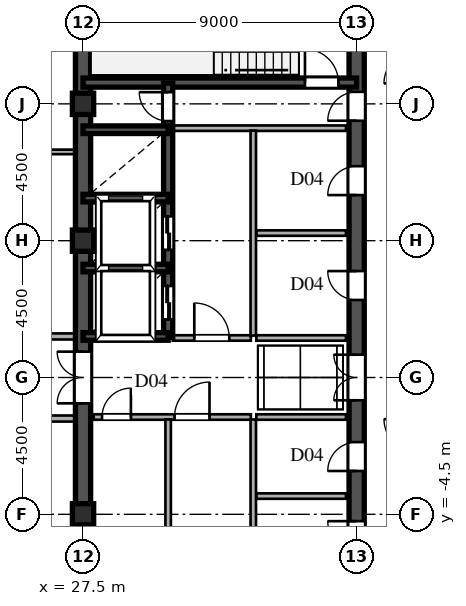
"""IFC4 building model, lengths in metres.
Left out: names, types, materials, properties, quantities, classifications, styles, units other than length and angle.
Written with IfcOpenShell. Run it as: python <this file> out.ifc"""

import sys

from ifc_helpers import new_model, si_unit, direction, frame, frame_2d, origin, origin_2d, place, context, subcontext, project, spatial, rectangle, hollow_rectangle, extrude, source, transform, mapped, element, fill, save


model = new_model("IFC4")
c1 = context("Model", 3, precision=1e-05, world=origin(), true_north=direction((0.0, 1.0)))
c2 = subcontext(c1, "Body", "Model", "MODEL_VIEW")
j1 = project(units=[si_unit("LENGTHUNIT", "METRE"), si_unit("PLANEANGLEUNIT", "RADIAN")], contexts=[c1])
p1 = place(None, origin())
s1 = spatial("IfcSite", under=j1, at=p1, CompositionType="ELEMENT")
p2 = place(p1, origin())
s2 = spatial("IfcBuilding", under=s1, at=p2, CompositionType="ELEMENT")
p3 = place(p2, frame((0.0, 0.0, 254.4)))
s3 = spatial("IfcBuildingStorey", under=s2, at=p3, CompositionType="ELEMENT", Elevation=254.4)
m1 = source(origin(), c2, "Body", "SweptSolid", [
    extrude(hollow_rectangle(XDim=0.7, YDim=0.7, WallThickness=0.03, at=origin_2d()), origin(), (0.0, 0.0, 1.0), 3.75),
])
for number, where, z_axis, x_axis in (
    (1, (27.5, -4.5, 0.0), (0.0, 0.0, 1.0), (1.0, 0.0, 0.0)),
    (2, (27.5, 4.5, 0.0), (0.0, 0.0, 1.0), (1.0, 0.0, 0.0)),
    (3, (27.5, 9.0, 0.0), (0.0, 0.0, 1.0), (1.0, 0.0, 0.0)),
):
    element("IfcColumn", number, at=place(p3, frame(where, z_axis=z_axis, x_axis=x_axis)), inside=s3, PredefinedType="COLUMN", context=c2, shape_type="MappedRepresentation", body=[
        mapped(m1, transform((0.0, 0.0, 0.0), scale=1.0)),
    ])
for number, where, z_axis, x_axis in (
    (4, (27.5, -13.5, 0.0), (0.0, 0.0, 1.0), (0.0, 1.0, 0.0)),
    (5, (27.5, 1.3, 0.0), (0.0, 0.0, 1.0), (0.0, 1.0, 0.0)),
):
    element("IfcWall", number, at=place(p3, frame(where, z_axis=z_axis, x_axis=x_axis)), inside=s3, PredefinedType="SHEAR", context=c2, shape_type="SweptSolid", body=[
        extrude(rectangle(XDim=12.2, YDim=0.5, at=frame_2d((6.1, 0.0))), origin(), (0.0, 0.0, 1.0), 3.53),
    ])
p4 = place(p3, frame((27.5, -1.3, 0.0), z_axis=(0.0, 0.0, 1.0), x_axis=(0.0, 1.0, 0.0)))
e6 = element("IfcWall", 6, at=p4, inside=s3, PredefinedType="SHEAR", context=c2, shape_type="SweptSolid", body=[
    extrude(rectangle(XDim=2.6, YDim=0.5, at=frame_2d((1.3, 0.0))), origin(), (0.0, 0.0, 1.0), 3.53),
])
p5 = place(p4, frame((0.45, 0.0, 0.0)))
e7 = element("IfcOpeningElement", 7, at=p5, cuts=e6, PredefinedType="OPENING", context=c2, shape_type="SweptSolid", body=[
    extrude(rectangle(XDim=1.7, YDim=2.35, at=frame_2d((0.85, 1.175))), frame((0.0, 0.26, 0.0), z_axis=(0.0, -1.0, 0.0), x_axis=(1.0, 0.0, 0.0)), (0.0, 0.0, 1.0), 0.52),
])
p6 = place(p3, frame((36.5, -1.3, 0.0), z_axis=(0.0, 0.0, 1.0), x_axis=(0.0, 1.0, 0.0)))
e8 = element("IfcWall", 8, at=p6, inside=s3, PredefinedType="SHEAR", context=c2, shape_type="SweptSolid", body=[
    extrude(rectangle(XDim=2.6, YDim=0.5, at=frame_2d((1.3, 0.0))), origin(), (0.0, 0.0, 1.0), 3.53),
])
p7 = place(p6, frame((0.55, 0.0, 0.0)))
e9 = element("IfcOpeningElement", 9, at=p7, cuts=e8, PredefinedType="OPENING", context=c2, shape_type="SweptSolid", body=[
    extrude(rectangle(XDim=1.5, YDim=2.3, at=frame_2d((0.75, 1.15))), frame((0.0, 0.26, 0.0), z_axis=(0.0, -1.0, 0.0), x_axis=(1.0, 0.0, 0.0)), (0.0, 0.0, 1.0), 0.52),
])
p8 = place(p3, frame((36.5, 8.2, 0.0), z_axis=(0.0, 0.0, 1.0), x_axis=(0.0, 1.0, 0.0)))
e10 = element("IfcWall", 10, at=p8, inside=s3, PredefinedType="SHEAR", context=c2, shape_type="SweptSolid", body=[
    extrude(rectangle(XDim=5.45, YDim=0.5, at=frame_2d((2.725, 0.0))), origin(), (0.0, 0.0, 1.0), 3.53),
])
p9 = place(p8, frame((0.245, 0.0, 0.0)))
e11 = element("IfcOpeningElement", 11, at=p9, cuts=e10, PredefinedType="OPENING", context=c2, shape_type="SweptSolid", body=[
    extrude(rectangle(XDim=0.95, YDim=2.15, at=frame_2d((0.475, 1.075))), frame((0.0, 0.26, 0.0), z_axis=(0.0, -1.0, 0.0), x_axis=(1.0, 0.0, 0.0)), (0.0, 0.0, 1.0), 0.52),
])
p10 = place(p3, frame((36.5, -6.5, 0.0), z_axis=(0.0, 0.0, 1.0), x_axis=(0.0, 1.0, 0.0)))
e12 = element("IfcWall", 12, at=p10, inside=s3, PredefinedType="SHEAR", context=c2, shape_type="SweptSolid", body=[
    extrude(rectangle(XDim=2.6, YDim=0.5, at=frame_2d((1.3, 0.0))), origin(), (0.0, 0.0, 1.0), 3.53),
])
p11 = place(p10, frame((0.825, 0.0, 0.0)))
e13 = element("IfcOpeningElement", 13, at=p11, cuts=e12, PredefinedType="OPENING", context=c2, shape_type="SweptSolid", body=[
    extrude(rectangle(XDim=0.95, YDim=2.15, at=frame_2d((0.475, 1.075))), frame((0.0, 0.26, 0.0), z_axis=(0.0, -1.0, 0.0), x_axis=(1.0, 0.0, 0.0)), (0.0, 0.0, 1.0), 0.52),
])
p12 = place(p3, frame((36.5, -3.9, 0.0), z_axis=(0.0, 0.0, 1.0), x_axis=(0.0, 1.0, 0.0)))
e14 = element("IfcWall", 14, at=p12, inside=s3, PredefinedType="SHEAR", context=c2, shape_type="SweptSolid", body=[
    extrude(rectangle(XDim=2.6, YDim=0.5, at=frame_2d((1.3, 0.0))), origin(), (0.0, 0.0, 1.0), 3.53),
])
p13 = place(p12, frame((0.825, 0.0, 0.0)))
e15 = element("IfcOpeningElement", 15, at=p13, cuts=e14, PredefinedType="OPENING", context=c2, shape_type="SweptSolid", body=[
    extrude(rectangle(XDim=0.95, YDim=2.15, at=frame_2d((0.475, 1.075))), frame((0.0, 0.26, 0.0), z_axis=(0.0, -1.0, 0.0), x_axis=(1.0, 0.0, 0.0)), (0.0, 0.0, 1.0), 0.52),
])
p14 = place(p3, frame((36.5, 1.3, 0.0), z_axis=(0.0, 0.0, 1.0), x_axis=(0.0, 1.0, 0.0)))
e16 = element("IfcWall", 16, at=p14, inside=s3, PredefinedType="SHEAR", context=c2, shape_type="SweptSolid", body=[
    extrude(rectangle(XDim=3.45, YDim=0.5, at=frame_2d((1.725, 0.0))), origin(), (0.0, 0.0, 1.0), 3.53),
])
p15 = place(p14, frame((1.25, 0.0, 0.0)))
e17 = element("IfcOpeningElement", 17, at=p15, cuts=e16, PredefinedType="OPENING", context=c2, shape_type="SweptSolid", body=[
    extrude(rectangle(XDim=0.95, YDim=2.15, at=frame_2d((0.475, 1.075))), frame((0.0, 0.26, 0.0), z_axis=(0.0, -1.0, 0.0), x_axis=(1.0, 0.0, 0.0)), (0.0, 0.0, 1.0), 0.52),
])
p16 = place(p3, frame((36.5, 4.75, 0.0), z_axis=(0.0, 0.0, 1.0), x_axis=(0.0, 1.0, 0.0)))
e18 = element("IfcWall", 18, at=p16, inside=s3, PredefinedType="SHEAR", context=c2, shape_type="SweptSolid", body=[
    extrude(rectangle(XDim=3.45, YDim=0.5, at=frame_2d((1.725, 0.0))), origin(), (0.0, 0.0, 1.0), 3.53),
])
p17 = place(p16, frame((1.25, 0.0, 0.0)))
e19 = element("IfcOpeningElement", 19, at=p17, cuts=e18, PredefinedType="OPENING", context=c2, shape_type="SweptSolid", body=[
    extrude(rectangle(XDim=0.95, YDim=2.15, at=frame_2d((0.475, 1.075))), frame((0.0, 0.26, 0.0), z_axis=(0.0, -1.0, 0.0), x_axis=(1.0, 0.0, 0.0)), (0.0, 0.0, 1.0), 0.52),
])
p18 = place(p3, frame((27.5, 9.7, 0.0), z_axis=(0.0, 0.0, 1.0), x_axis=(1.0, 0.0, 0.0)))
e20 = element("IfcWall", 20, at=p18, inside=s3, PredefinedType="SHEAR", context=c2, shape_type="SweptSolid", body=[
    extrude(rectangle(XDim=9.0, YDim=0.3, at=frame_2d((4.5, 0.0))), origin(), (0.0, 0.0, 1.0), 3.53),
])
p19 = place(p18, frame((7.3, 0.0, 0.0)))
e21 = element("IfcOpeningElement", 21, at=p19, cuts=e20, PredefinedType="OPENING", context=c2, shape_type="SweptSolid", body=[
    extrude(rectangle(XDim=1.1, YDim=2.2, at=frame_2d((0.55, 1.1))), frame((0.0, 0.16, 0.0), z_axis=(0.0, -1.0, 0.0), x_axis=(1.0, 0.0, 0.0)), (0.0, 0.0, 1.0), 0.32),
])
for number, where, z_axis, x_axis in (
    (22, (27.5, 1.35, 0.0), (0.0, 0.0, 1.0), (1.0, 0.0, 0.0)),
    (23, (27.5, 3.6, 0.0), (0.0, 0.0, 1.0), (1.0, 0.0, 0.0)),
    (24, (27.5, 5.9, 0.0), (0.0, 0.0, 1.0), (1.0, 0.0, 0.0)),
    (25, (27.5, 8.15, 0.0), (0.0, 0.0, 1.0), (1.0, 0.0, 0.0)),
):
    element("IfcWall", number, at=place(p3, frame(where, z_axis=z_axis, x_axis=x_axis)), inside=s3, PredefinedType="SHEAR", context=c2, shape_type="SweptSolid", body=[
        extrude(rectangle(XDim=2.8, YDim=0.25, at=frame_2d((1.4, 0.0))), origin(), (0.0, 0.0, 1.0), 3.53),
    ])
p20 = place(p3, frame((30.3, 1.32, 0.0), z_axis=(0.0, 0.0, 1.0), x_axis=(0.0, 1.0, 0.0)))
e26 = element("IfcWall", 26, at=p20, inside=s3, PredefinedType="SHEAR", context=c2, shape_type="SweptSolid", body=[
    extrude(rectangle(XDim=2.28, YDim=0.3, at=frame_2d((1.14, 0.0))), origin(), (0.0, 0.0, 1.0), 3.53),
])
p21 = place(p20, frame((0.59, 0.0, 0.0)))
e27 = element("IfcOpeningElement", 27, at=p21, cuts=e26, PredefinedType="OPENING", context=c2, shape_type="SweptSolid", body=[
    extrude(rectangle(XDim=1.1, YDim=2.2, at=frame_2d((0.55, 1.1))), frame((0.0, 0.16, 0.0), z_axis=(0.0, -1.0, 0.0), x_axis=(1.0, 0.0, 0.0)), (0.0, 0.0, 1.0), 0.32),
])
p22 = place(p3, frame((30.3, 3.6, 0.0), z_axis=(0.0, 0.0, 1.0), x_axis=(0.0, 1.0, 0.0)))
e28 = element("IfcWall", 28, at=p22, inside=s3, PredefinedType="SHEAR", context=c2, shape_type="SweptSolid", body=[
    extrude(rectangle(XDim=2.3, YDim=0.3, at=frame_2d((1.15, 0.0))), origin(), (0.0, 0.0, 1.0), 3.53),
])
p23 = place(p22, frame((0.6, 0.0, 0.0)))
e29 = element("IfcOpeningElement", 29, at=p23, cuts=e28, PredefinedType="OPENING", context=c2, shape_type="SweptSolid", body=[
    extrude(rectangle(XDim=1.1, YDim=2.2, at=frame_2d((0.55, 1.1))), frame((0.0, 0.16, 0.0), z_axis=(0.0, -1.0, 0.0), x_axis=(1.0, 0.0, 0.0)), (0.0, 0.0, 1.0), 0.32),
])
p24 = place(p3, frame((30.3, 5.9, 0.0), z_axis=(0.0, 0.0, 1.0), x_axis=(0.0, 1.0, 0.0)))
e30 = element("IfcWall", 30, at=p24, inside=s3, PredefinedType="SHEAR", context=c2, shape_type="SweptSolid", body=[
    extrude(rectangle(XDim=2.25, YDim=0.3, at=frame_2d((1.125, 0.0))), origin(), (0.0, 0.0, 1.0), 3.53),
])
p25 = place(p3, frame((30.3, 8.15, 0.0), z_axis=(0.0, 0.0, 1.0), x_axis=(0.0, 1.0, 0.0)))
e31 = element("IfcWall", 31, at=p25, inside=s3, PredefinedType="SHEAR", context=c2, shape_type="SweptSolid", body=[
    extrude(rectangle(XDim=1.53, YDim=0.3, at=frame_2d((0.765, 0.0))), origin(), (0.0, 0.0, 1.0), 3.53),
])
p26 = place(p25, frame((0.285, 0.0, 0.0)))
e32 = element("IfcOpeningElement", 32, at=p26, cuts=e31, PredefinedType="OPENING", context=c2, shape_type="SweptSolid", body=[
    extrude(rectangle(XDim=0.95, YDim=2.15, at=frame_2d((0.475, 1.075))), frame((0.0, 0.16, 0.0), z_axis=(0.0, -1.0, 0.0), x_axis=(1.0, 0.0, 0.0)), (0.0, 0.0, 1.0), 0.32),
])
p27 = place(p3, frame((30.45, 8.2, 0.0), z_axis=(0.0, 0.0, 1.0), x_axis=(1.0, 0.0, 0.0)))
e33 = element("IfcWall", 33, at=p27, inside=s3, PredefinedType="PARTITIONING", context=c2, shape_type="SweptSolid", body=[
    extrude(rectangle(XDim=5.7, YDim=0.18, at=frame_2d((2.85, 0.0))), origin(), (0.0, 0.0, 1.0), 3.53),
])
p28 = place(p3, frame((33.1, -6.42, 0.0), z_axis=(0.0, 0.0, 1.0), x_axis=(0.0, 1.0, 0.0)))
e34 = element("IfcWall", 34, at=p28, inside=s3, PredefinedType="PARTITIONING", context=c2, shape_type="SweptSolid", body=[
    extrude(rectangle(XDim=5.04, YDim=0.18, at=frame_2d((2.52, 0.0))), origin(), (0.0, 0.0, 1.0), 3.53),
])
p29 = place(p3, frame((33.1, 1.38, 0.0), z_axis=(0.0, 0.0, 1.0), x_axis=(0.0, 1.0, 0.0)))
e35 = element("IfcWall", 35, at=p29, inside=s3, PredefinedType="PARTITIONING", context=c2, shape_type="SweptSolid", body=[
    extrude(rectangle(XDim=6.74, YDim=0.18, at=frame_2d((3.37, 0.0))), origin(), (0.0, 0.0, 1.0), 3.53),
])
p30 = place(p3, frame((27.85, -1.3, 0.0), z_axis=(0.0, 0.0, 1.0), x_axis=(1.0, 0.0, 0.0)))
e36 = element("IfcWall", 36, at=p30, inside=s3, PredefinedType="PARTITIONING", context=c2, shape_type="SweptSolid", body=[
    extrude(rectangle(XDim=2.45, YDim=0.18, at=frame_2d((1.225, 0.0))), origin(), (0.0, 0.0, 1.0), 3.53),
])
p31 = place(p30, frame((0.275, 0.0, 0.0)))
e37 = element("IfcOpeningElement", 37, at=p31, cuts=e36, PredefinedType="OPENING", context=c2, shape_type="SweptSolid", body=[
    extrude(rectangle(XDim=0.95, YDim=2.15, at=frame_2d((0.475, 1.075))), frame((0.0, 0.1, 0.0), z_axis=(0.0, -1.0, 0.0), x_axis=(1.0, 0.0, 0.0)), (0.0, 0.0, 1.0), 0.2),
])
p32 = place(p3, frame((30.3, -1.3, 0.0), z_axis=(0.0, 0.0, 1.0), x_axis=(1.0, 0.0, 0.0)))
e38 = element("IfcWall", 38, at=p32, inside=s3, PredefinedType="PARTITIONING", context=c2, shape_type="SweptSolid", body=[
    extrude(rectangle(XDim=2.72, YDim=0.18, at=frame_2d((1.36, 0.0))), origin(), (0.0, 0.0, 1.0), 3.53),
])
p33 = place(p32, frame((0.21, 0.0, 0.0)))
e39 = element("IfcOpeningElement", 39, at=p33, cuts=e38, PredefinedType="OPENING", context=c2, shape_type="SweptSolid", body=[
    extrude(rectangle(XDim=1.15, YDim=2.2, at=frame_2d((0.575, 1.1))), frame((0.0, 0.1, 0.0), z_axis=(0.0, -1.0, 0.0), x_axis=(1.0, 0.0, 0.0)), (0.0, 0.0, 1.0), 0.2),
])
p34 = place(p3, frame((30.3, -7.12, 0.0), z_axis=(0.0, 0.0, 1.0), x_axis=(0.0, 1.0, 0.0)))
e40 = element("IfcWall", 40, at=p34, inside=s3, PredefinedType="PARTITIONING", context=c2, shape_type="SweptSolid", body=[
    extrude(rectangle(XDim=5.74, YDim=0.18, at=frame_2d((2.87, 0.0))), origin(), (0.0, 0.0, 1.0), 3.53),
])
p35 = place(p3, frame((30.45, 1.3, 0.0), z_axis=(0.0, 0.0, 1.0), x_axis=(1.0, 0.0, 0.0)))
e41 = element("IfcWall", 41, at=p35, inside=s3, PredefinedType="PARTITIONING", context=c2, shape_type="SweptSolid", body=[
    extrude(rectangle(XDim=2.57, YDim=0.18, at=frame_2d((1.285, 0.0))), origin(), (0.0, 0.0, 1.0), 3.53),
])
p36 = place(p35, frame((0.71, 0.0, 0.0)))
e42 = element("IfcOpeningElement", 42, at=p36, cuts=e41, PredefinedType="OPENING", context=c2, shape_type="SweptSolid", body=[
    extrude(rectangle(XDim=1.15, YDim=2.2, at=frame_2d((0.575, 1.1))), frame((0.0, 0.1, 0.0), z_axis=(0.0, -1.0, 0.0), x_axis=(1.0, 0.0, 0.0)), (0.0, 0.0, 1.0), 0.2),
])
for number, where, z_axis, x_axis in (
    (43, (33.2, -1.3, 0.0), (0.0, 0.0, 1.0), (1.0, 0.0, 0.0)),
    (44, (33.2, 1.3, 0.0), (0.0, 0.0, 1.0), (1.0, 0.0, 0.0)),
    (45, (33.2, -3.9, 0.0), (0.0, 0.0, 1.0), (1.0, 0.0, 0.0)),
    (46, (33.2, 4.75, 0.0), (0.0, 0.0, 1.0), (1.0, 0.0, 0.0)),
):
    element("IfcWall", number, at=place(p3, frame(where, z_axis=z_axis, x_axis=x_axis)), inside=s3, PredefinedType="PARTITIONING", context=c2, shape_type="SweptSolid", body=[
        extrude(rectangle(XDim=2.95, YDim=0.18, at=frame_2d((1.475, 0.0))), origin(), (0.0, 0.0, 1.0), 3.53),
    ])
p37 = place(p3, frame((-27.245, -1.35, 0.0), z_axis=(0.0, 0.0, 1.0), x_axis=(1.0, 0.0, 0.0)))
e47 = element("IfcWall", 47, at=p37, inside=s3, PredefinedType="PARTITIONING", context=c2, shape_type="SweptSolid", body=[
    extrude(rectangle(XDim=54.49, YDim=0.2, at=frame_2d((27.245, 0.0))), origin(), (0.0, 0.0, 1.0), 3.53),
])
p38 = place(p37, frame((24.97, 0.0, 0.0)))
e48 = element("IfcOpeningElement", 48, at=p38, cuts=e47, PredefinedType="OPENING", context=c2, shape_type="SweptSolid", body=[
    extrude(rectangle(XDim=1.05, YDim=2.25, at=frame_2d((0.525, 1.125))), frame((0.0, 0.11, 0.0), z_axis=(0.0, -1.0, 0.0), x_axis=(1.0, 0.0, 0.0)), (0.0, 0.0, 1.0), 0.22),
])
p39 = place(p3, frame((-27.245, 1.35, 0.0), z_axis=(0.0, 0.0, 1.0), x_axis=(1.0, 0.0, 0.0)))
e49 = element("IfcWall", 49, at=p39, inside=s3, PredefinedType="PARTITIONING", context=c2, shape_type="SweptSolid", body=[
    extrude(rectangle(XDim=54.49, YDim=0.2, at=frame_2d((27.245, 0.0))), origin(), (0.0, 0.0, 1.0), 3.53),
])
p40 = place(p39, frame((24.97, 0.0, 0.0)))
e50 = element("IfcOpeningElement", 50, at=p40, cuts=e49, PredefinedType="OPENING", context=c2, shape_type="SweptSolid", body=[
    extrude(rectangle(XDim=1.05, YDim=2.25, at=frame_2d((0.525, 1.125))), frame((0.0, 0.11, 0.0), z_axis=(0.0, -1.0, 0.0), x_axis=(1.0, 0.0, 0.0)), (0.0, 0.0, 1.0), 0.22),
])
p41 = place(p3, frame((7.085, 7.42, 0.0), z_axis=(0.0, 0.0, 1.0), x_axis=(1.0, 0.0, 0.0)))
e51 = element("IfcWall", 51, at=p41, inside=s3, PredefinedType="PARTITIONING", context=c2, shape_type="SweptSolid", body=[
    extrude(rectangle(XDim=20.16, YDim=0.15, at=frame_2d((10.08, 0.0))), origin(), (0.0, 0.0, 1.0), 3.53),
])
p42 = place(p41, frame((3.44, 0.0, 0.0)))
e52 = element("IfcOpeningElement", 52, at=p42, cuts=e51, PredefinedType="OPENING", context=c2, shape_type="SweptSolid", body=[
    extrude(rectangle(XDim=0.95, YDim=2.15, at=frame_2d((0.475, 1.075))), frame((0.0, 0.085, 0.0), z_axis=(0.0, -1.0, 0.0), x_axis=(1.0, 0.0, 0.0)), (0.0, 0.0, 1.0), 0.17),
])
p43 = place(p41, frame((10.69, 0.0, 0.0)))
e53 = element("IfcOpeningElement", 53, at=p43, cuts=e51, PredefinedType="OPENING", context=c2, shape_type="SweptSolid", body=[
    extrude(rectangle(XDim=0.95, YDim=2.15, at=frame_2d((0.475, 1.075))), frame((0.0, 0.085, 0.0), z_axis=(0.0, -1.0, 0.0), x_axis=(1.0, 0.0, 0.0)), (0.0, 0.0, 1.0), 0.17),
])
p44 = place(p41, frame((16.94, 0.0, 0.0)))
e54 = element("IfcOpeningElement", 54, at=p44, cuts=e51, PredefinedType="OPENING", context=c2, shape_type="SweptSolid", body=[
    extrude(rectangle(XDim=0.95, YDim=2.15, at=frame_2d((0.475, 1.075))), frame((0.0, 0.085, 0.0), z_axis=(0.0, -1.0, 0.0), x_axis=(1.0, 0.0, 0.0)), (0.0, 0.0, 1.0), 0.17),
])
m2 = source(origin(), c2, "Body", "SweptSolid", [
    extrude(rectangle(XDim=1.7, YDim=2.35, at=frame_2d((0.85, 1.175))), frame((0.0, 0.025, 0.0), z_axis=(0.0, -1.0, 0.0), x_axis=(1.0, 0.0, 0.0)), (0.0, 0.0, 1.0), 0.05),
])
p45 = place(p5, origin())
e55 = element("IfcDoor", 55, at=p45, inside=s3, OperationType="DOUBLE_SWING_LEFT", PredefinedType="DOOR", context=c2, shape_type="MappedRepresentation", body=[
    mapped(m2, transform((0.0, 0.0, 0.0), scale=1.0)),
])
fill(e7, e55)
m3 = source(origin(), c2, "Body", "SweptSolid", [
    extrude(rectangle(XDim=1.5, YDim=2.3, at=frame_2d((0.75, 1.15))), frame((0.0, 0.025, 0.0), z_axis=(0.0, -1.0, 0.0), x_axis=(1.0, 0.0, 0.0)), (0.0, 0.0, 1.0), 0.05),
])
p46 = place(p7, origin())
e56 = element("IfcDoor", 56, at=p46, inside=s3, OperationType="DOUBLE_SWING_LEFT", PredefinedType="DOOR", context=c2, shape_type="MappedRepresentation", body=[
    mapped(m3, transform((0.0, 0.0, 0.0), scale=1.0)),
])
fill(e9, e56)
m4 = source(origin(), c2, "Body", "SweptSolid", [
    extrude(rectangle(XDim=0.95, YDim=2.15, at=frame_2d((0.475, 1.075))), frame((0.0, 0.025, 0.0), z_axis=(0.0, -1.0, 0.0), x_axis=(1.0, 0.0, 0.0)), (0.0, 0.0, 1.0), 0.05),
])
p47 = place(p9, origin())
e57 = element("IfcDoor", 57, at=p47, inside=s3, OperationType="SINGLE_SWING_LEFT", PredefinedType="DOOR", context=c2, shape_type="MappedRepresentation", body=[
    mapped(m4, transform((0.0, 0.0, 0.0), scale=1.0)),
])
fill(e11, e57)
p48 = place(p11, origin())
e58 = element("IfcDoor", 58, at=p48, inside=s3, OperationType="SINGLE_SWING_RIGHT", PredefinedType="DOOR", context=c2, shape_type="MappedRepresentation", body=[
    mapped(m4, transform((0.0, 0.0, 0.0), scale=1.0)),
])
fill(e13, e58)
p49 = place(p13, origin())
e59 = element("IfcDoor", 59, at=p49, inside=s3, OperationType="SINGLE_SWING_LEFT", PredefinedType="DOOR", context=c2, shape_type="MappedRepresentation", body=[
    mapped(m4, transform((0.0, 0.0, 0.0), scale=1.0)),
])
fill(e15, e59)
p50 = place(p15, origin())
e60 = element("IfcDoor", 60, at=p50, inside=s3, OperationType="SINGLE_SWING_RIGHT", PredefinedType="DOOR", context=c2, shape_type="MappedRepresentation", body=[
    mapped(m4, transform((0.0, 0.0, 0.0), scale=1.0)),
])
fill(e17, e60)
p51 = place(p17, origin())
e61 = element("IfcDoor", 61, at=p51, inside=s3, OperationType="SINGLE_SWING_LEFT", PredefinedType="DOOR", context=c2, shape_type="MappedRepresentation", body=[
    mapped(m4, transform((0.0, 0.0, 0.0), scale=1.0)),
])
fill(e19, e61)
m5 = source(origin(), c2, "Body", "SweptSolid", [
    extrude(rectangle(XDim=1.1, YDim=2.2, at=frame_2d((0.55, 1.1))), frame((0.0, 0.025, 0.0), z_axis=(0.0, -1.0, 0.0), x_axis=(1.0, 0.0, 0.0)), (0.0, 0.0, 1.0), 0.05),
])
p52 = place(p19, origin())
e62 = element("IfcDoor", 62, at=p52, inside=s3, OperationType="SINGLE_SWING_LEFT", PredefinedType="DOOR", context=c2, shape_type="MappedRepresentation", body=[
    mapped(m5, transform((0.0, 0.0, 0.0), scale=1.0)),
])
fill(e21, e62)
m6 = source(origin(), c2, "Body", "SweptSolid", [
    extrude(rectangle(XDim=1.1, YDim=2.2, at=frame_2d((0.55, 1.1))), frame((0.0, 0.025, 0.0), z_axis=(0.0, -1.0, 0.0), x_axis=(1.0, 0.0, 0.0)), (0.0, 0.0, 1.0), 0.05),
])
p53 = place(p21, origin())
e63 = element("IfcDoor", 63, at=p53, inside=s3, OperationType="DOUBLE_DOOR_SLIDING", PredefinedType="DOOR", context=c2, shape_type="MappedRepresentation", body=[
    mapped(m6, transform((0.0, 0.0, 0.0), scale=1.0)),
])
fill(e27, e63)
p54 = place(p23, origin())
e64 = element("IfcDoor", 64, at=p54, inside=s3, OperationType="DOUBLE_DOOR_SLIDING", PredefinedType="DOOR", context=c2, shape_type="MappedRepresentation", body=[
    mapped(m6, transform((0.0, 0.0, 0.0), scale=1.0)),
])
fill(e29, e64)
p55 = place(p26, origin())
e65 = element("IfcDoor", 65, at=p55, inside=s3, OperationType="SINGLE_SWING_RIGHT", PredefinedType="DOOR", context=c2, shape_type="MappedRepresentation", body=[
    mapped(m4, transform((0.0, 0.0, 0.0), scale=1.0)),
])
fill(e32, e65)
p56 = place(p31, origin())
e66 = element("IfcDoor", 66, at=p56, inside=s3, OperationType="SINGLE_SWING_RIGHT", PredefinedType="DOOR", context=c2, shape_type="MappedRepresentation", body=[
    mapped(m4, transform((0.0, 0.0, 0.0), scale=1.0)),
])
fill(e37, e66)
m7 = source(origin(), c2, "Body", "SweptSolid", [
    extrude(rectangle(XDim=1.15, YDim=2.2, at=frame_2d((0.575, 1.1))), frame((0.0, 0.025, 0.0), z_axis=(0.0, -1.0, 0.0), x_axis=(1.0, 0.0, 0.0)), (0.0, 0.0, 1.0), 0.05),
])
p57 = place(p33, origin())
e67 = element("IfcDoor", 67, at=p57, inside=s3, OperationType="SINGLE_SWING_RIGHT", PredefinedType="DOOR", context=c2, shape_type="MappedRepresentation", body=[
    mapped(m7, transform((0.0, 0.0, 0.0), scale=1.0)),
])
fill(e39, e67)
p58 = place(p36, origin())
e68 = element("IfcDoor", 68, at=p58, inside=s3, OperationType="SINGLE_SWING_LEFT", PredefinedType="DOOR", context=c2, shape_type="MappedRepresentation", body=[
    mapped(m7, transform((0.0, 0.0, 0.0), scale=1.0)),
])
fill(e42, e68)
save(model, sys.argv[1])
